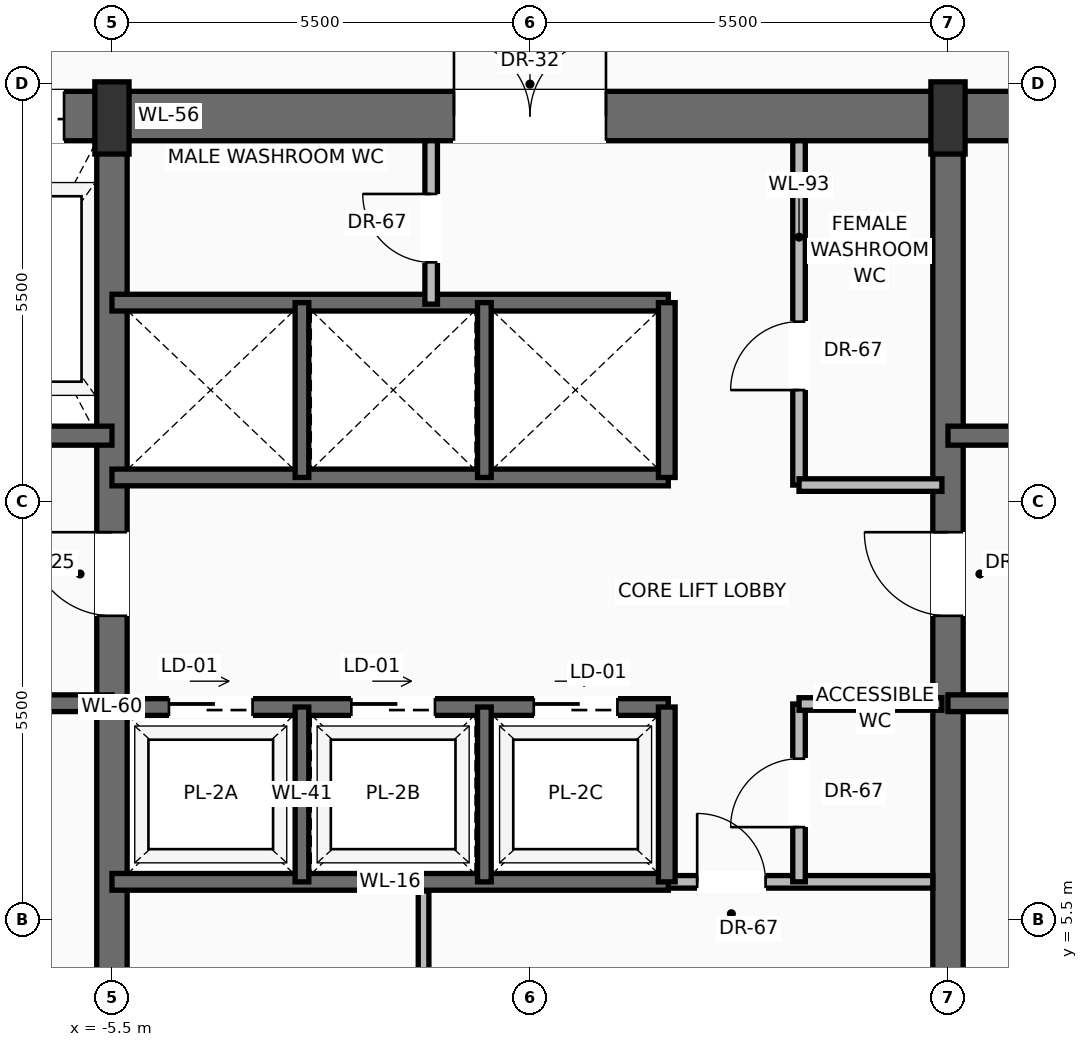
"""IFC4 building model, lengths in metres.
Left out: names, types, materials, properties, quantities, classifications, styles, units other than length and angle.
Written with IfcOpenShell. Run it as: python <this file> out.ifc"""

import sys

from ifc_helpers import new_model, si_unit, direction, frame, frame_2d, origin, origin_2d, place, context, subcontext, project, spatial, rectangle, extrude, source, transform, mapped, element, fill, save


model = new_model("IFC4")
c1 = context("Model", 3, precision=1e-05, world=origin(), true_north=direction((0.0, 1.0)))
c2 = subcontext(c1, "Body", "Model", "MODEL_VIEW")
j1 = project(units=[si_unit("LENGTHUNIT", "METRE"), si_unit("PLANEANGLEUNIT", "RADIAN")], contexts=[c1])
p1 = place(None, origin())
s1 = spatial("IfcSite", under=j1, at=p1, CompositionType="ELEMENT")
p2 = place(p1, origin())
s2 = spatial("IfcBuilding", under=s1, at=p2, CompositionType="ELEMENT")
p3 = place(p2, frame((0.0, 0.0, 166.3)))
s3 = spatial("IfcBuildingStorey", under=s2, at=p3, CompositionType="ELEMENT", Elevation=166.3)
p4 = place(p3, frame((-10.8, 16.075, 0.0), z_axis=(0.0, 0.0, 1.0), x_axis=(1.0, 0.0, 0.0)))
e1 = element("IfcWall", 1, at=p4, inside=s3, PredefinedType="SHEAR", context=c2, shape_type="SweptSolid", body=[
    extrude(rectangle(XDim=21.6, YDim=0.65, at=frame_2d((10.8, 0.0))), origin(), (0.0, 0.0, 1.0), 4.47),
])
p5 = place(p4, frame((3.37, 0.0, 0.0)))
e2 = element("IfcOpeningElement", 2, at=p5, cuts=e1, PredefinedType="OPENING", context=c2, shape_type="SweptSolid", body=[
    extrude(rectangle(XDim=1.3, YDim=2.3, at=frame_2d((0.65, 1.15))), frame((0.0, 0.335, 0.0), z_axis=(0.0, -1.0, 0.0), x_axis=(1.0, 0.0, 0.0)), (0.0, 0.0, 1.0), 0.67),
])
p6 = place(p4, frame((9.8, 0.0, 0.0)))
e3 = element("IfcOpeningElement", 3, at=p6, cuts=e1, PredefinedType="OPENING", context=c2, shape_type="SweptSolid", body=[
    extrude(rectangle(XDim=2.0, YDim=2.4, at=frame_2d((1.0, 1.2))), frame((0.0, 0.335, 0.0), z_axis=(0.0, -1.0, 0.0), x_axis=(1.0, 0.0, 0.0)), (0.0, 0.0, 1.0), 0.67),
])
p7 = place(p3, frame((-5.5, 0.525, 0.0), z_axis=(0.0, 0.0, 1.0), x_axis=(0.0, 1.0, 0.0)))
e4 = element("IfcWall", 4, at=p7, inside=s3, PredefinedType="SHEAR", context=c2, shape_type="SweptSolid", body=[
    extrude(rectangle(XDim=15.55, YDim=0.4, at=frame_2d((7.775, 0.0))), origin(), (0.0, 0.0, 1.0), 4.47),
])
p8 = place(p7, frame((8.975, 0.0, 0.0)))
e5 = element("IfcOpeningElement", 5, at=p8, cuts=e4, PredefinedType="OPENING", context=c2, shape_type="SweptSolid", body=[
    extrude(rectangle(XDim=1.1, YDim=2.2, at=frame_2d((0.55, 1.1))), frame((0.0, 0.21, 0.0), z_axis=(0.0, -1.0, 0.0), x_axis=(1.0, 0.0, 0.0)), (0.0, 0.0, 1.0), 0.42),
])
p9 = place(p3, frame((5.5, 0.525, 0.0), z_axis=(0.0, 0.0, 1.0), x_axis=(0.0, 1.0, 0.0)))
e6 = element("IfcWall", 6, at=p9, inside=s3, PredefinedType="SHEAR", context=c2, shape_type="SweptSolid", body=[
    extrude(rectangle(XDim=15.55, YDim=0.4, at=frame_2d((7.775, 0.0))), origin(), (0.0, 0.0, 1.0), 4.47),
])
p10 = place(p9, frame((8.975, 0.0, 0.0)))
e7 = element("IfcOpeningElement", 7, at=p10, cuts=e6, PredefinedType="OPENING", context=c2, shape_type="SweptSolid", body=[
    extrude(rectangle(XDim=1.1, YDim=2.2, at=frame_2d((0.55, 1.1))), frame((0.0, 0.21, 0.0), z_axis=(0.0, -1.0, 0.0), x_axis=(1.0, 0.0, 0.0)), (0.0, 0.0, 1.0), 0.42),
])
m1 = source(origin(), c2, "Body", "SweptSolid", [
    extrude(rectangle(XDim=0.45, YDim=0.95, at=origin_2d()), origin(), (0.0, 0.0, 1.0), 4.7),
])
for number, where, z_axis, x_axis in (
    (8, (-5.5, 16.05, 0.0), (0.0, 0.0, 1.0), (1.0, 0.0, 0.0)),
    (9, (5.5, 16.05, 0.0), (0.0, 0.0, 1.0), (1.0, 0.0, 0.0)),
):
    element("IfcColumn", number, at=place(p3, frame(where, z_axis=z_axis, x_axis=x_axis)), inside=s3, PredefinedType="PILASTER", context=c2, shape_type="MappedRepresentation", body=[
        mapped(m1, transform((0.0, 0.0, 0.0), scale=1.0)),
    ])
p11 = place(p3, frame((-5.5, 8.35, 0.0), z_axis=(0.0, 0.0, 1.0), x_axis=(-1.0, 0.0, 0.0)))
e10 = element("IfcWall", 10, at=p11, inside=s3, PredefinedType="SOLIDWALL", context=c2, shape_type="SweptSolid", body=[
    extrude(rectangle(XDim=4.65, YDim=0.22, at=frame_2d((2.325, 0.0))), origin(), (0.0, 0.0, 1.0), 4.47),
])
p12 = place(p11, frame((2.5, 0.0, 0.0)))
e11 = element("IfcOpeningElement", 11, at=p12, cuts=e10, PredefinedType="OPENING", context=c2, shape_type="SweptSolid", body=[
    extrude(rectangle(XDim=1.15, YDim=2.2, at=frame_2d((0.575, 1.1))), frame((0.0, 0.12, 0.0), z_axis=(0.0, -1.0, 0.0), x_axis=(1.0, 0.0, 0.0)), (0.0, 0.0, 1.0), 0.24),
])
p13 = place(p3, frame((-5.5, 11.87, 0.0), z_axis=(0.0, 0.0, 1.0), x_axis=(-1.0, 0.0, 0.0)))
e12 = element("IfcWall", 12, at=p13, inside=s3, PredefinedType="SOLIDWALL", context=c2, shape_type="SweptSolid", body=[
    extrude(rectangle(XDim=4.65, YDim=0.25, at=frame_2d((2.325, 0.0))), origin(), (0.0, 0.0, 1.0), 4.47),
])
p14 = place(p13, frame((2.95, 0.0, 0.0)))
e13 = element("IfcOpeningElement", 13, at=p14, cuts=e12, PredefinedType="OPENING", context=c2, shape_type="SweptSolid", body=[
    extrude(rectangle(XDim=1.2, YDim=2.25, at=frame_2d((0.6, 1.125))), frame((0.0, 0.135, 0.0), z_axis=(0.0, -1.0, 0.0), x_axis=(1.0, 0.0, 0.0)), (0.0, 0.0, 1.0), 0.27),
])
p15 = place(p3, frame((10.15, 8.35, 0.0), z_axis=(0.0, 0.0, 1.0), x_axis=(-1.0, 0.0, 0.0)))
e14 = element("IfcWall", 14, at=p15, inside=s3, PredefinedType="SOLIDWALL", context=c2, shape_type="SweptSolid", body=[
    extrude(rectangle(XDim=4.65, YDim=0.22, at=frame_2d((2.325, 0.0))), origin(), (0.0, 0.0, 1.0), 4.47),
])
p16 = place(p15, frame((1.0, 0.0, 0.0)))
e15 = element("IfcOpeningElement", 15, at=p16, cuts=e14, PredefinedType="OPENING", context=c2, shape_type="SweptSolid", body=[
    extrude(rectangle(XDim=1.15, YDim=2.2, at=frame_2d((0.575, 1.1))), frame((0.0, 0.12, 0.0), z_axis=(0.0, -1.0, 0.0), x_axis=(1.0, 0.0, 0.0)), (0.0, 0.0, 1.0), 0.24),
])
p17 = place(p3, frame((10.15, 11.87, 0.0), z_axis=(0.0, 0.0, 1.0), x_axis=(-1.0, 0.0, 0.0)))
e16 = element("IfcWall", 16, at=p17, inside=s3, PredefinedType="SOLIDWALL", context=c2, shape_type="SweptSolid", body=[
    extrude(rectangle(XDim=4.65, YDim=0.25, at=frame_2d((2.325, 0.0))), origin(), (0.0, 0.0, 1.0), 4.47),
])
p18 = place(p17, frame((0.5, 0.0, 0.0)))
e17 = element("IfcOpeningElement", 17, at=p18, cuts=e16, PredefinedType="OPENING", context=c2, shape_type="SweptSolid", body=[
    extrude(rectangle(XDim=1.2, YDim=2.25, at=frame_2d((0.6, 1.125))), frame((0.0, 0.135, 0.0), z_axis=(0.0, -1.0, 0.0), x_axis=(1.0, 0.0, 0.0)), (0.0, 0.0, 1.0), 0.27),
])
p19 = place(p3, frame((1.82, 6.0, 0.0), z_axis=(0.0, 0.0, 1.0), x_axis=(1.0, 0.0, 0.0)))
e18 = element("IfcWall", 18, at=p19, inside=s3, PredefinedType="PARTITIONING", context=c2, shape_type="SweptSolid", body=[
    extrude(rectangle(XDim=3.48, YDim=0.165, at=frame_2d((1.74, 0.0))), origin(), (0.0, 0.0, 1.0), 4.462),
])
p20 = place(p19, frame((0.38, 0.0, 0.0)))
e19 = element("IfcOpeningElement", 19, at=p20, cuts=e18, PredefinedType="OPENING", context=c2, shape_type="SweptSolid", body=[
    extrude(rectangle(XDim=0.9, YDim=2.1, at=frame_2d((0.45, 1.05))), frame((0.0, 0.093, 0.0), z_axis=(0.0, -1.0, 0.0), x_axis=(1.0, 0.0, 0.0)), (0.0, 0.0, 1.0), 0.185),
])
p21 = place(p3, frame((-1.4, 0.85, 0.0), z_axis=(0.0, 0.0, 1.0), x_axis=(0.0, 1.0, 0.0)))
e20 = element("IfcWall", 20, at=p21, inside=s3, PredefinedType="PARTITIONING", context=c2, shape_type="SweptSolid", body=[
    extrude(rectangle(XDim=5.03, YDim=0.14, at=frame_2d((2.515, 0.0))), origin(), (0.0, 0.0, 1.0), 4.462),
])
p22 = place(p21, frame((2.1, 0.0, 0.0)))
e21 = element("IfcOpeningElement", 21, at=p22, cuts=e20, PredefinedType="OPENING", context=c2, shape_type="SweptSolid", body=[
    extrude(rectangle(XDim=0.9, YDim=2.1, at=frame_2d((0.45, 1.05))), frame((0.0, 0.08, 0.0), z_axis=(0.0, -1.0, 0.0), x_axis=(1.0, 0.0, 0.0)), (0.0, 0.0, 1.0), 0.16),
])
p23 = place(p3, frame((3.54, 6.0, 0.0), z_axis=(0.0, 0.0, 1.0), x_axis=(0.0, 1.0, 0.0)))
e22 = element("IfcWall", 22, at=p23, inside=s3, PredefinedType="PARTITIONING", context=c2, shape_type="SweptSolid", body=[
    extrude(rectangle(XDim=2.34, YDim=0.165, at=frame_2d((1.17, 0.0))), origin(), (0.0, 0.0, 1.0), 4.462),
])
p24 = place(p23, frame((0.72, 0.0, 0.0)))
e23 = element("IfcOpeningElement", 23, at=p24, cuts=e22, PredefinedType="OPENING", context=c2, shape_type="SweptSolid", body=[
    extrude(rectangle(XDim=0.9, YDim=2.1, at=frame_2d((0.45, 1.05))), frame((0.0, 0.093, 0.0), z_axis=(0.0, -1.0, 0.0), x_axis=(1.0, 0.0, 0.0)), (0.0, 0.0, 1.0), 0.185),
])
p25 = place(p3, frame((3.54, 8.34, 0.0), z_axis=(0.0, 0.0, 1.0), x_axis=(1.0, 0.0, 0.0)))
e24 = element("IfcWall", 24, at=p25, inside=s3, PredefinedType="PARTITIONING", context=c2, shape_type="SweptSolid", body=[
    extrude(rectangle(XDim=1.88, YDim=0.165, at=frame_2d((0.94, 0.0))), origin(), (0.0, 0.0, 1.0), 4.462),
])
p26 = place(p3, frame((-5.5, 6.0, 0.0), z_axis=(0.0, 0.0, 1.0), x_axis=(1.0, 0.0, 0.0)))
e25 = element("IfcWall", 25, at=p26, inside=s3, PredefinedType="SOLIDWALL", context=c2, shape_type="SweptSolid", body=[
    extrude(rectangle(XDim=7.32, YDim=0.22, at=frame_2d((3.66, 0.0))), origin(), (0.0, 0.0, 1.0), 4.47),
])
p27 = place(p3, frame((-5.5, 8.3, 0.0), z_axis=(0.0, 0.0, 1.0), x_axis=(1.0, 0.0, 0.0)))
e26 = element("IfcWall", 26, at=p27, inside=s3, PredefinedType="SOLIDWALL", context=c2, shape_type="SweptSolid", body=[
    extrude(rectangle(XDim=7.32, YDim=0.22, at=frame_2d((3.66, 0.0))), origin(), (0.0, 0.0, 1.0), 4.47),
])
p28 = place(p27, frame((0.75, 0.0, 0.0)))
e27 = element("IfcOpeningElement", 27, at=p28, cuts=e26, PredefinedType="OPENING", context=c2, shape_type="SweptSolid", body=[
    extrude(rectangle(XDim=1.1, YDim=2.2, at=frame_2d((0.55, 1.1))), frame((0.0, 0.12, 0.0), z_axis=(0.0, -1.0, 0.0), x_axis=(1.0, 0.0, 0.0)), (0.0, 0.0, 1.0), 0.24),
])
p29 = place(p27, frame((3.15, 0.0, 0.0)))
e28 = element("IfcOpeningElement", 28, at=p29, cuts=e26, PredefinedType="OPENING", context=c2, shape_type="SweptSolid", body=[
    extrude(rectangle(XDim=1.1, YDim=2.2, at=frame_2d((0.55, 1.1))), frame((0.0, 0.12, 0.0), z_axis=(0.0, -1.0, 0.0), x_axis=(1.0, 0.0, 0.0)), (0.0, 0.0, 1.0), 0.24),
])
p30 = place(p27, frame((5.55, 0.0, 0.0)))
e29 = element("IfcOpeningElement", 29, at=p30, cuts=e26, PredefinedType="OPENING", context=c2, shape_type="SweptSolid", body=[
    extrude(rectangle(XDim=1.1, YDim=2.2, at=frame_2d((0.55, 1.1))), frame((0.0, 0.12, 0.0), z_axis=(0.0, -1.0, 0.0), x_axis=(1.0, 0.0, 0.0)), (0.0, 0.0, 1.0), 0.24),
])
p31 = place(p3, frame((1.8, 6.0, 0.0), z_axis=(0.0, 0.0, 1.0), x_axis=(0.0, 1.0, 0.0)))
e30 = element("IfcWall", 30, at=p31, inside=s3, PredefinedType="SOLIDWALL", context=c2, shape_type="SweptSolid", body=[
    extrude(rectangle(XDim=2.3, YDim=0.22, at=frame_2d((1.15, 0.0))), origin(), (0.0, 0.0, 1.0), 4.47),
])
for number, where, z_axis, x_axis in (
    (31, (-3.0, 6.0, 0.0), (0.0, 0.0, 1.0), (0.0, 1.0, 0.0)),
    (32, (-0.6, 6.0, 0.0), (0.0, 0.0, 1.0), (0.0, 1.0, 0.0)),
):
    element("IfcWall", number, at=place(p3, frame(where, z_axis=z_axis, x_axis=x_axis)), inside=s3, PredefinedType="SOLIDWALL", context=c2, shape_type="SweptSolid", body=[
        extrude(rectangle(XDim=2.3, YDim=0.18, at=frame_2d((1.15, 0.0))), origin(), (0.0, 0.0, 1.0), 4.47),
    ])
for number, where, z_axis, x_axis in (
    (33, (-5.5, 11.32, 0.0), (0.0, 0.0, 1.0), (1.0, 0.0, 0.0)),
    (34, (-5.5, 13.62, 0.0), (0.0, 0.0, 1.0), (1.0, 0.0, 0.0)),
):
    element("IfcWall", number, at=place(p3, frame(where, z_axis=z_axis, x_axis=x_axis)), inside=s3, PredefinedType="SOLIDWALL", context=c2, shape_type="SweptSolid", body=[
        extrude(rectangle(XDim=7.32, YDim=0.22, at=frame_2d((3.66, 0.0))), origin(), (0.0, 0.0, 1.0), 4.47),
    ])
p32 = place(p3, frame((1.8, 11.32, 0.0), z_axis=(0.0, 0.0, 1.0), x_axis=(0.0, 1.0, 0.0)))
e35 = element("IfcWall", 35, at=p32, inside=s3, PredefinedType="SOLIDWALL", context=c2, shape_type="SweptSolid", body=[
    extrude(rectangle(XDim=2.3, YDim=0.22, at=frame_2d((1.15, 0.0))), origin(), (0.0, 0.0, 1.0), 4.47),
])
for number, where, z_axis, x_axis in (
    (36, (-3.0, 11.32, 0.0), (0.0, 0.0, 1.0), (0.0, 1.0, 0.0)),
    (37, (-0.6, 11.32, 0.0), (0.0, 0.0, 1.0), (0.0, 1.0, 0.0)),
):
    element("IfcWall", number, at=place(p3, frame(where, z_axis=z_axis, x_axis=x_axis)), inside=s3, PredefinedType="SOLIDWALL", context=c2, shape_type="SweptSolid", body=[
        extrude(rectangle(XDim=2.3, YDim=0.18, at=frame_2d((1.15, 0.0))), origin(), (0.0, 0.0, 1.0), 4.47),
    ])
p33 = place(p3, frame((-1.3, 13.6, 0.0), z_axis=(0.0, 0.0, 1.0), x_axis=(0.0, 1.0, 0.0)))
e38 = element("IfcWall", 38, at=p33, inside=s3, PredefinedType="PARTITIONING", context=c2, shape_type="SweptSolid", body=[
    extrude(rectangle(XDim=2.15, YDim=0.165, at=frame_2d((1.075, 0.0))), origin(), (0.0, 0.0, 1.0), 4.462),
])
p34 = place(p33, frame((0.55, 0.0, 0.0)))
e39 = element("IfcOpeningElement", 39, at=p34, cuts=e38, PredefinedType="OPENING", context=c2, shape_type="SweptSolid", body=[
    extrude(rectangle(XDim=0.9, YDim=2.1, at=frame_2d((0.45, 1.05))), frame((0.0, 0.093, 0.0), z_axis=(0.0, -1.0, 0.0), x_axis=(1.0, 0.0, 0.0)), (0.0, 0.0, 1.0), 0.185),
])
p35 = place(p3, frame((3.54, 11.22, 0.0), z_axis=(0.0, 0.0, 1.0), x_axis=(0.0, 1.0, 0.0)))
e40 = element("IfcWall", 40, at=p35, inside=s3, PredefinedType="PARTITIONING", context=c2, shape_type="SweptSolid", body=[
    extrude(rectangle(XDim=4.53, YDim=0.165, at=frame_2d((2.265, 0.0))), origin(), (0.0, 0.0, 1.0), 4.462),
])
p36 = place(p35, frame((1.25, 0.0, 0.0)))
e41 = element("IfcOpeningElement", 41, at=p36, cuts=e40, PredefinedType="OPENING", context=c2, shape_type="SweptSolid", body=[
    extrude(rectangle(XDim=0.9, YDim=2.1, at=frame_2d((0.45, 1.05))), frame((0.0, 0.093, 0.0), z_axis=(0.0, -1.0, 0.0), x_axis=(1.0, 0.0, 0.0)), (0.0, 0.0, 1.0), 0.185),
])
p37 = place(p3, frame((3.54, 11.22, 0.0), z_axis=(0.0, 0.0, 1.0), x_axis=(1.0, 0.0, 0.0)))
e42 = element("IfcWall", 42, at=p37, inside=s3, PredefinedType="PARTITIONING", context=c2, shape_type="SweptSolid", body=[
    extrude(rectangle(XDim=1.88, YDim=0.165, at=frame_2d((0.94, 0.0))), origin(), (0.0, 0.0, 1.0), 4.462),
])
m2 = source(origin(), c2, "Body", "SweptSolid", [
    extrude(rectangle(XDim=1.1, YDim=2.2, at=frame_2d((0.55, 1.1))), frame((0.0, 0.025, 0.0), z_axis=(0.0, -1.0, 0.0), x_axis=(1.0, 0.0, 0.0)), (0.0, 0.0, 1.0), 0.05),
])
p38 = place(p8, origin())
e43 = element("IfcDoor", 43, at=p38, inside=s3, OperationType="SINGLE_SWING_RIGHT", PredefinedType="DOOR", context=c2, shape_type="MappedRepresentation", body=[
    mapped(m2, transform((0.0, 0.0, 0.0), scale=1.0)),
])
fill(e5, e43)
m3 = source(origin(), c2, "Body", "SweptSolid", [
    extrude(rectangle(XDim=1.3, YDim=2.3, at=frame_2d((0.65, 1.15))), frame((0.0, 0.025, 0.0), z_axis=(0.0, -1.0, 0.0), x_axis=(1.0, 0.0, 0.0)), (0.0, 0.0, 1.0), 0.05),
])
p39 = place(p5, origin())
e44 = element("IfcDoor", 44, at=p39, inside=s3, OperationType="SLIDING_TO_RIGHT", PredefinedType="DOOR", context=c2, shape_type="MappedRepresentation", body=[
    mapped(m3, transform((0.0, 0.0, 0.0), scale=1.0)),
])
fill(e2, e44)
p40 = place(p10, origin())
e45 = element("IfcDoor", 45, at=p40, inside=s3, OperationType="SINGLE_SWING_RIGHT", PredefinedType="DOOR", context=c2, shape_type="MappedRepresentation", body=[
    mapped(m2, transform((0.0, 0.0, 0.0), scale=1.0)),
])
fill(e7, e45)
m4 = source(origin(), c2, "Body", "SweptSolid", [
    extrude(rectangle(XDim=2.0, YDim=2.4, at=frame_2d((1.0, 1.2))), frame((0.0, 0.025, 0.0), z_axis=(0.0, -1.0, 0.0), x_axis=(1.0, 0.0, 0.0)), (0.0, 0.0, 1.0), 0.05),
])
p41 = place(p6, origin())
e46 = element("IfcDoor", 46, at=p41, inside=s3, OperationType="DOUBLE_DOOR_SINGLE_SWING", PredefinedType="DOOR", context=c2, shape_type="MappedRepresentation", body=[
    mapped(m4, transform((0.0, 0.0, 0.0), scale=1.0)),
])
fill(e3, e46)
m5 = source(origin(), c2, "Body", "SweptSolid", [
    extrude(rectangle(XDim=0.9, YDim=2.1, at=frame_2d((0.45, 1.05))), frame((0.0, 0.025, 0.0), z_axis=(0.0, -1.0, 0.0), x_axis=(1.0, 0.0, 0.0)), (0.0, 0.0, 1.0), 0.05),
])
p42 = place(p20, origin())
e47 = element("IfcDoor", 47, at=p42, inside=s3, OperationType="SINGLE_SWING_LEFT", PredefinedType="DOOR", context=c2, shape_type="MappedRepresentation", body=[
    mapped(m5, transform((0.0, 0.0, 0.0), scale=1.0)),
])
fill(e19, e47)
p43 = place(p24, origin())
e48 = element("IfcDoor", 48, at=p43, inside=s3, OperationType="SINGLE_SWING_LEFT", PredefinedType="DOOR", context=c2, shape_type="MappedRepresentation", body=[
    mapped(m5, transform((0.0, 0.0, 0.0), scale=1.0)),
])
fill(e23, e48)
m6 = source(origin(), c2, "Body", "SweptSolid", [
    extrude(rectangle(XDim=1.1, YDim=2.2, at=frame_2d((0.55, 1.1))), frame((0.0, 0.025, 0.0), z_axis=(0.0, -1.0, 0.0), x_axis=(1.0, 0.0, 0.0)), (0.0, 0.0, 1.0), 0.05),
])
p44 = place(p28, origin())
e49 = element("IfcDoor", 49, at=p44, inside=s3, OperationType="SLIDING_TO_LEFT", PredefinedType="DOOR", context=c2, shape_type="MappedRepresentation", body=[
    mapped(m6, transform((0.0, 0.0, 0.0), scale=1.0)),
])
fill(e27, e49)
p45 = place(p29, origin())
e50 = element("IfcDoor", 50, at=p45, inside=s3, OperationType="SLIDING_TO_LEFT", PredefinedType="DOOR", context=c2, shape_type="MappedRepresentation", body=[
    mapped(m6, transform((0.0, 0.0, 0.0), scale=1.0)),
])
fill(e28, e50)
p46 = place(p30, origin())
e51 = element("IfcDoor", 51, at=p46, inside=s3, OperationType="SLIDING_TO_LEFT", PredefinedType="DOOR", context=c2, shape_type="MappedRepresentation", body=[
    mapped(m6, transform((0.0, 0.0, 0.0), scale=1.0)),
])
fill(e29, e51)
p47 = place(p34, origin())
e52 = element("IfcDoor", 52, at=p47, inside=s3, OperationType="SINGLE_SWING_RIGHT", PredefinedType="DOOR", context=c2, shape_type="MappedRepresentation", body=[
    mapped(m5, transform((0.0, 0.0, 0.0), scale=1.0)),
])
fill(e39, e52)
p48 = place(p36, origin())
e53 = element("IfcDoor", 53, at=p48, inside=s3, OperationType="SINGLE_SWING_LEFT", PredefinedType="DOOR", context=c2, shape_type="MappedRepresentation", body=[
    mapped(m5, transform((0.0, 0.0, 0.0), scale=1.0)),
])
fill(e41, e53)
save(model, sys.argv[1])
